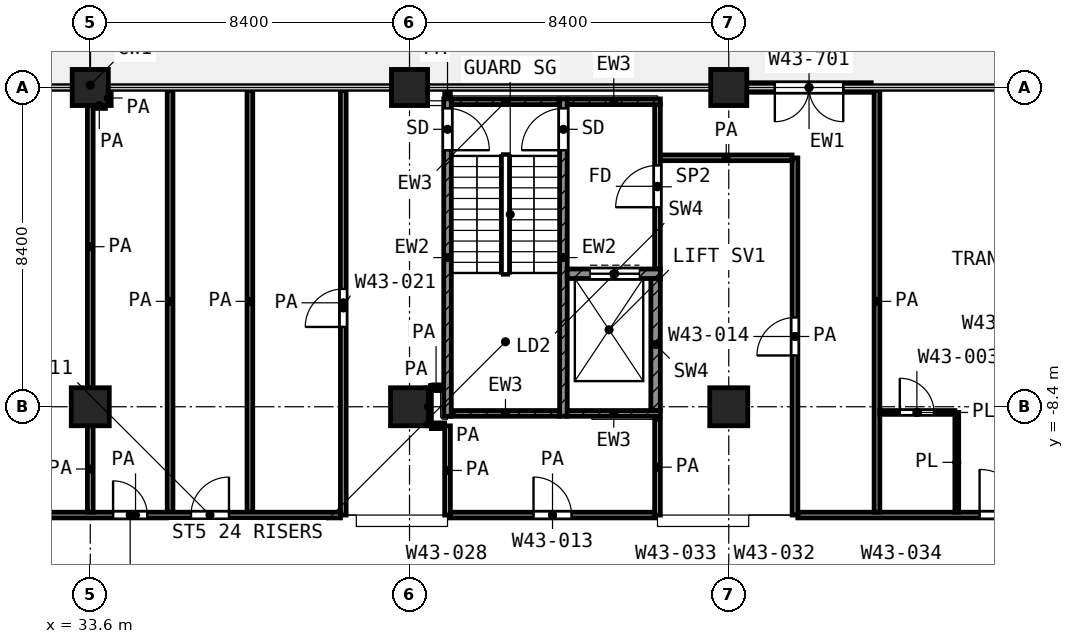
"""IFC4 building model, lengths in metres.
Left out: names, types, materials, properties, quantities, classifications, styles, units other than length and angle.
Written with IfcOpenShell. Run it as: python <this file> out.ifc"""

import sys

from ifc_helpers import new_model, si_unit, direction, frame, frame_2d, origin, origin_2d, place, context, subcontext, project, spatial, rectangle, extrude, element, fill, save


model = new_model("IFC4")
c1 = context("Model", 3, precision=1e-05, world=origin(), true_north=direction((0.0, 1.0)))
c2 = subcontext(c1, "Body", "Model", "MODEL_VIEW")
j1 = project(units=[si_unit("LENGTHUNIT", "METRE"), si_unit("PLANEANGLEUNIT", "RADIAN")], contexts=[c1])
p1 = place(None, origin())
s1 = spatial("IfcSite", under=j1, at=p1, CompositionType="ELEMENT")
p2 = place(p1, origin())
s2 = spatial("IfcBuilding", under=s1, at=p2, CompositionType="ELEMENT")
p3 = place(p2, frame((0.0, 0.0, 208.8)))
s3 = spatial("IfcBuildingStorey", under=s2, at=p3, CompositionType="ELEMENT", Elevation=208.8)
for number, where, z_axis, x_axis in (
    (1, (33.6, 0.0, 0.0), (0.0, 0.0, 1.0), (1.0, 0.0, 0.0)),
    (2, (42.0, 0.0, 0.0), (0.0, 0.0, 1.0), (1.0, 0.0, 0.0)),
    (3, (50.4, 0.0, 0.0), (0.0, 0.0, 1.0), (1.0, 0.0, 0.0)),
):
    element("IfcColumn", number, at=place(p3, frame(where, z_axis=z_axis, x_axis=x_axis)), inside=s3, PredefinedType="COLUMN", context=c2, shape_type="SweptSolid", body=[
        extrude(rectangle(XDim=0.95, YDim=0.95, at=origin_2d()), origin(), (0.0, 0.0, 1.0), 4.2),
    ])
for number, where, z_axis, x_axis in (
    (4, (33.6, -8.4, 0.0), (0.0, 0.0, 1.0), (1.0, 0.0, 0.0)),
    (5, (42.0, -8.4, 0.0), (0.0, 0.0, 1.0), (1.0, 0.0, 0.0)),
    (6, (50.4, -8.4, 0.0), (0.0, 0.0, 1.0), (1.0, 0.0, 0.0)),
):
    element("IfcColumn", number, at=place(p3, frame(where, z_axis=z_axis, x_axis=x_axis)), inside=s3, PredefinedType="COLUMN", context=c2, shape_type="SweptSolid", body=[
        extrude(rectangle(XDim=1.0, YDim=1.0, at=origin_2d()), origin(), (0.0, 0.0, 1.0), 4.2),
    ])
p4 = place(p3, frame((54.15, 0.0, 0.0), z_axis=(0.0, 0.0, 1.0), x_axis=(-1.0, 0.0, 0.0)))
e7 = element("IfcWall", 7, at=p4, inside=s3, PredefinedType="SOLIDWALL", context=c2, shape_type="SweptSolid", body=[
    extrude(rectangle(XDim=3.275, YDim=0.25, at=frame_2d((1.637, 0.0))), origin(), (0.0, 0.0, 1.0), 3.58),
])
p5 = place(p4, frame((0.738, 0.0, 0.0)))
e8 = element("IfcOpeningElement", 8, at=p5, cuts=e7, PredefinedType="OPENING", context=c2, shape_type="SweptSolid", body=[
    extrude(rectangle(XDim=1.8, YDim=2.1, at=frame_2d((0.9, 1.05))), frame((0.0, 0.135, 0.0), z_axis=(0.0, -1.0, 0.0), x_axis=(1.0, 0.0, 0.0)), (0.0, 0.0, 1.0), 0.27),
])
p6 = place(p3, frame((43.0, -8.65, 0.0), z_axis=(0.0, 0.0, 1.0), x_axis=(0.0, 1.0, 0.0)))
e9 = element("IfcWall", 9, at=p6, inside=s3, PredefinedType="SHEAR", context=c2, shape_type="SweptSolid", body=[
    extrude(rectangle(XDim=8.35, YDim=0.2, at=frame_2d((4.175, 0.0))), origin(), (0.0, 0.0, 1.0), 3.7),
])
p7 = place(p6, frame((7.0, 0.0, 0.0)))
e10 = element("IfcOpeningElement", 10, at=p7, cuts=e9, PredefinedType="OPENING", context=c2, shape_type="SweptSolid", body=[
    extrude(rectangle(XDim=1.1, YDim=2.1, at=frame_2d((0.55, 1.05))), frame((0.0, 0.11, 0.0), z_axis=(0.0, -1.0, 0.0), x_axis=(1.0, 0.0, 0.0)), (0.0, 0.0, 1.0), 0.22),
])
p8 = place(p3, frame((46.05, -8.65, 0.0), z_axis=(0.0, 0.0, 1.0), x_axis=(0.0, 1.0, 0.0)))
e11 = element("IfcWall", 11, at=p8, inside=s3, PredefinedType="SHEAR", context=c2, shape_type="SweptSolid", body=[
    extrude(rectangle(XDim=8.35, YDim=0.2, at=frame_2d((4.175, 0.0))), origin(), (0.0, 0.0, 1.0), 3.7),
])
p9 = place(p8, frame((7.0, 0.0, 0.0)))
e12 = element("IfcOpeningElement", 12, at=p9, cuts=e11, PredefinedType="OPENING", context=c2, shape_type="SweptSolid", body=[
    extrude(rectangle(XDim=1.1, YDim=2.1, at=frame_2d((0.55, 1.05))), frame((0.0, 0.11, 0.0), z_axis=(0.0, -1.0, 0.0), x_axis=(1.0, 0.0, 0.0)), (0.0, 0.0, 1.0), 0.22),
])
p10 = place(p3, frame((43.1, -0.375, 0.0), z_axis=(0.0, 0.0, 1.0), x_axis=(1.0, 0.0, 0.0)))
e13 = element("IfcWall", 13, at=p10, inside=s3, PredefinedType="SHEAR", context=c2, shape_type="SweptSolid", body=[
    extrude(rectangle(XDim=2.85, YDim=0.15, at=frame_2d((1.425, 0.0))), origin(), (0.0, 0.0, 1.0), 3.7),
])
p11 = place(p3, frame((46.15, -0.375, 0.0), z_axis=(0.0, 0.0, 1.0), x_axis=(1.0, 0.0, 0.0)))
e14 = element("IfcWall", 14, at=p11, inside=s3, PredefinedType="SHEAR", context=c2, shape_type="SweptSolid", body=[
    extrude(rectangle(XDim=2.45, YDim=0.15, at=frame_2d((1.225, 0.0))), origin(), (0.0, 0.0, 1.0), 3.7),
])
p12 = place(p3, frame((43.1, -8.575, 0.0), z_axis=(0.0, 0.0, 1.0), x_axis=(1.0, 0.0, 0.0)))
e15 = element("IfcWall", 15, at=p12, inside=s3, PredefinedType="SHEAR", context=c2, shape_type="SweptSolid", body=[
    extrude(rectangle(XDim=2.85, YDim=0.15, at=frame_2d((1.425, 0.0))), origin(), (0.0, 0.0, 1.0), 3.7),
])
p13 = place(p3, frame((46.15, -8.575, 0.0), z_axis=(0.0, 0.0, 1.0), x_axis=(1.0, 0.0, 0.0)))
e16 = element("IfcWall", 16, at=p13, inside=s3, PredefinedType="SHEAR", context=c2, shape_type="SweptSolid", body=[
    extrude(rectangle(XDim=2.45, YDim=0.15, at=frame_2d((1.225, 0.0))), origin(), (0.0, 0.0, 1.0), 3.7),
])
p14 = place(p3, frame((46.15, -4.9, 0.0), z_axis=(0.0, 0.0, 1.0), x_axis=(1.0, 0.0, 0.0)))
e17 = element("IfcWall", 17, at=p14, inside=s3, PredefinedType="SHEAR", context=c2, shape_type="SweptSolid", body=[
    extrude(rectangle(XDim=2.45, YDim=0.25, at=frame_2d((1.225, 0.0))), origin(), (0.0, 0.0, 1.0), 3.7),
])
p15 = place(p14, frame((0.6, 0.0, 0.0)))
e18 = element("IfcOpeningElement", 18, at=p15, cuts=e17, PredefinedType="OPENING", context=c2, shape_type="SweptSolid", body=[
    extrude(rectangle(XDim=1.3, YDim=2.1, at=frame_2d((0.65, 1.05))), frame((0.0, 0.135, 0.0), z_axis=(0.0, -1.0, 0.0), x_axis=(1.0, 0.0, 0.0)), (0.0, 0.0, 1.0), 0.27),
])
p16 = place(p3, frame((48.475, -8.5, 0.0), z_axis=(0.0, 0.0, 1.0), x_axis=(0.0, 1.0, 0.0)))
e19 = element("IfcWall", 19, at=p16, inside=s3, PredefinedType="SHEAR", context=c2, shape_type="SweptSolid", body=[
    extrude(rectangle(XDim=3.475, YDim=0.25, at=frame_2d((1.738, 0.0))), origin(), (0.0, 0.0, 1.0), 3.7),
])
p17 = place(p3, frame((48.525, -4.775, 0.0), z_axis=(0.0, 0.0, 1.0), x_axis=(0.0, 1.0, 0.0)))
e20 = element("IfcWall", 20, at=p17, inside=s3, PredefinedType="PARTITIONING", context=c2, shape_type="SweptSolid", body=[
    extrude(rectangle(XDim=4.325, YDim=0.15, at=frame_2d((2.163, 0.0))), origin(), (0.0, 0.0, 1.0), 3.7),
])
p18 = place(p17, frame((1.625, 0.0, 0.0)))
e21 = element("IfcOpeningElement", 21, at=p18, cuts=e20, PredefinedType="OPENING", context=c2, shape_type="SweptSolid", body=[
    extrude(rectangle(XDim=1.1, YDim=2.1, at=frame_2d((0.55, 1.05))), frame((0.0, 0.085, 0.0), z_axis=(0.0, -1.0, 0.0), x_axis=(1.0, 0.0, 0.0)), (0.0, 0.0, 1.0), 0.17),
])
p19 = place(p3, frame((54.375, -8.55, 0.0), z_axis=(0.0, 0.0, 1.0), x_axis=(1.0, 0.0, 0.0)))
e22 = element("IfcWall", 22, at=p19, inside=s3, PredefinedType="PARTITIONING", context=c2, shape_type="SweptSolid", body=[
    extrude(rectangle(XDim=1.975, YDim=0.1, at=frame_2d((0.988, 0.0))), origin(), (0.0, 0.0, 1.0), 3.7),
])
p20 = place(p19, frame((0.525, 0.0, 0.0)))
e23 = element("IfcOpeningElement", 23, at=p20, cuts=e22, PredefinedType="OPENING", context=c2, shape_type="SweptSolid", body=[
    extrude(rectangle(XDim=0.9, YDim=2.1, at=frame_2d((0.45, 1.05))), frame((0.0, 0.06, 0.0), z_axis=(0.0, -1.0, 0.0), x_axis=(1.0, 0.0, 0.0)), (0.0, 0.0, 1.0), 0.12),
])
p21 = place(p3, frame((56.4, -11.175, 0.0), z_axis=(0.0, 0.0, 1.0), x_axis=(0.0, 1.0, 0.0)))
e24 = element("IfcWall", 24, at=p21, inside=s3, PredefinedType="PARTITIONING", context=c2, shape_type="SweptSolid", body=[
    extrude(rectangle(XDim=2.625, YDim=0.1, at=frame_2d((1.312, 0.0))), origin(), (0.0, 0.0, 1.0), 3.7),
])
p22 = place(p3, frame((29.4, -11.25, 0.0), z_axis=(0.0, 0.0, 1.0), x_axis=(1.0, 0.0, 0.0)))
e25 = element("IfcWall", 25, at=p22, inside=s3, PredefinedType="PARTITIONING", context=c2, shape_type="SweptSolid", body=[
    extrude(rectangle(XDim=10.782, YDim=0.15, at=frame_2d((5.391, 0.0))), origin(), (0.0, 0.0, 1.0), 3.7),
])
p23 = place(p22, frame((1.6, 0.0, 0.0)))
e26 = element("IfcOpeningElement", 26, at=p23, cuts=e25, PredefinedType="OPENING", context=c2, shape_type="SweptSolid", body=[
    extrude(rectangle(XDim=1.0, YDim=2.1, at=frame_2d((0.5, 1.05))), frame((0.0, 0.085, 0.0), z_axis=(0.0, -1.0, 0.0), x_axis=(1.0, 0.0, 0.0)), (0.0, 0.0, 1.0), 0.17),
])
p24 = place(p22, frame((4.8, 0.0, 0.0)))
e27 = element("IfcOpeningElement", 27, at=p24, cuts=e25, PredefinedType="OPENING", context=c2, shape_type="SweptSolid", body=[
    extrude(rectangle(XDim=0.9, YDim=2.1, at=frame_2d((0.45, 1.05))), frame((0.0, 0.085, 0.0), z_axis=(0.0, -1.0, 0.0), x_axis=(1.0, 0.0, 0.0)), (0.0, 0.0, 1.0), 0.17),
])
p25 = place(p22, frame((6.85, 0.0, 0.0)))
e28 = element("IfcOpeningElement", 28, at=p25, cuts=e25, PredefinedType="OPENING", context=c2, shape_type="SweptSolid", body=[
    extrude(rectangle(XDim=1.0, YDim=2.1, at=frame_2d((0.5, 1.05))), frame((0.0, 0.085, 0.0), z_axis=(0.0, -1.0, 0.0), x_axis=(1.0, 0.0, 0.0)), (0.0, 0.0, 1.0), 0.17),
])
p26 = place(p3, frame((43.075, -11.25, 0.0), z_axis=(0.0, 0.0, 1.0), x_axis=(1.0, 0.0, 0.0)))
e29 = element("IfcWall", 29, at=p26, inside=s3, PredefinedType="PARTITIONING", context=c2, shape_type="SweptSolid", body=[
    extrude(rectangle(XDim=5.375, YDim=0.15, at=frame_2d((2.688, 0.0))), origin(), (0.0, 0.0, 1.0), 3.7),
])
p27 = place(p26, frame((2.188, 0.0, 0.0)))
e30 = element("IfcOpeningElement", 30, at=p27, cuts=e29, PredefinedType="OPENING", context=c2, shape_type="SweptSolid", body=[
    extrude(rectangle(XDim=1.0, YDim=2.1, at=frame_2d((0.5, 1.05))), frame((0.0, 0.085, 0.0), z_axis=(0.0, -1.0, 0.0), x_axis=(1.0, 0.0, 0.0)), (0.0, 0.0, 1.0), 0.17),
])
p28 = place(p3, frame((52.218, -11.25, 0.0), z_axis=(0.0, 0.0, 1.0), x_axis=(1.0, 0.0, 0.0)))
e31 = element("IfcWall", 31, at=p28, inside=s3, PredefinedType="PARTITIONING", context=c2, shape_type="SweptSolid", body=[
    extrude(rectangle(XDim=14.902, YDim=0.15, at=frame_2d((7.451, 0.0))), origin(), (0.0, 0.0, 1.0), 3.7),
])
p29 = place(p28, frame((4.782, 0.0, 0.0)))
e32 = element("IfcOpeningElement", 32, at=p29, cuts=e31, PredefinedType="OPENING", context=c2, shape_type="SweptSolid", body=[
    extrude(rectangle(XDim=1.2, YDim=2.1, at=frame_2d((0.6, 1.05))), frame((0.0, 0.085, 0.0), z_axis=(0.0, -1.0, 0.0), x_axis=(1.0, 0.0, 0.0)), (0.0, 0.0, 1.0), 0.17),
])
p30 = place(p28, frame((6.382, 0.0, 0.0)))
e33 = element("IfcOpeningElement", 33, at=p30, cuts=e31, PredefinedType="OPENING", context=c2, shape_type="SweptSolid", body=[
    extrude(rectangle(XDim=1.2, YDim=2.1, at=frame_2d((0.6, 1.05))), frame((0.0, 0.085, 0.0), z_axis=(0.0, -1.0, 0.0), x_axis=(1.0, 0.0, 0.0)), (0.0, 0.0, 1.0), 0.17),
])
p31 = place(p28, frame((9.432, 0.0, 0.0)))
e34 = element("IfcOpeningElement", 34, at=p31, cuts=e31, PredefinedType="OPENING", context=c2, shape_type="SweptSolid", body=[
    extrude(rectangle(XDim=1.2, YDim=2.1, at=frame_2d((0.6, 1.05))), frame((0.0, 0.085, 0.0), z_axis=(0.0, -1.0, 0.0), x_axis=(1.0, 0.0, 0.0)), (0.0, 0.0, 1.0), 0.17),
])
p32 = place(p28, frame((12.532, 0.0, 0.0)))
e35 = element("IfcOpeningElement", 35, at=p32, cuts=e31, PredefinedType="OPENING", context=c2, shape_type="SweptSolid", body=[
    extrude(rectangle(XDim=1.0, YDim=2.1, at=frame_2d((0.5, 1.05))), frame((0.0, 0.085, 0.0), z_axis=(0.0, -1.0, 0.0), x_axis=(1.0, 0.0, 0.0)), (0.0, 0.0, 1.0), 0.17),
])
p33 = place(p3, frame((42.577, -8.9, 0.0), z_axis=(0.0, 0.0, 1.0), x_axis=(1.0, 0.0, 0.0)))
e36 = element("IfcWall", 36, at=p33, inside=s3, PredefinedType="PARTITIONING", context=c2, shape_type="SweptSolid", body=[
    extrude(rectangle(XDim=0.346, YDim=0.15, at=frame_2d((0.173, 0.0))), origin(), (0.0, 0.0, 1.0), 3.7),
])
p34 = place(p3, frame((42.577, -7.9, 0.0), z_axis=(0.0, 0.0, 1.0), x_axis=(1.0, 0.0, 0.0)))
e37 = element("IfcWall", 37, at=p34, inside=s3, PredefinedType="PARTITIONING", context=c2, shape_type="SweptSolid", body=[
    extrude(rectangle(XDim=0.243, YDim=0.15, at=frame_2d((0.122, 0.0))), origin(), (0.0, 0.0, 1.0), 3.7),
])
p35 = place(p3, frame((48.6, -1.85, 0.0), z_axis=(0.0, 0.0, 1.0), x_axis=(1.0, 0.0, 0.0)))
e38 = element("IfcWall", 38, at=p35, inside=s3, PredefinedType="PARTITIONING", context=c2, shape_type="SweptSolid", body=[
    extrude(rectangle(XDim=3.466, YDim=0.15, at=frame_2d((1.733, 0.0))), origin(), (0.0, 0.0, 1.0), 3.7),
])
p36 = place(p3, frame((33.677, -0.475, 0.0), z_axis=(0.0, 0.0, 1.0), x_axis=(1.0, 0.0, 0.0)))
e39 = element("IfcWall", 39, at=p36, inside=s3, PredefinedType="PARTITIONING", context=c2, shape_type="SweptSolid", body=[
    extrude(rectangle(XDim=0.321, YDim=0.15, at=frame_2d((0.161, 0.0))), origin(), (0.0, 0.0, 1.0), 3.7),
])
p37 = place(p3, frame((33.6, -11.175, 0.0), z_axis=(0.0, 0.0, 1.0), x_axis=(0.0, 1.0, 0.0)))
e40 = element("IfcWall", 40, at=p37, inside=s3, PredefinedType="PARTITIONING", context=c2, shape_type="SweptSolid", body=[
    extrude(rectangle(XDim=2.275, YDim=0.15, at=frame_2d((1.138, 0.0))), origin(), (0.0, 0.0, 1.0), 3.7),
])
p38 = place(p3, frame((33.6, -7.9, 0.0), z_axis=(0.0, 0.0, 1.0), x_axis=(0.0, 1.0, 0.0)))
e41 = element("IfcWall", 41, at=p38, inside=s3, PredefinedType="PARTITIONING", context=c2, shape_type="SweptSolid", body=[
    extrude(rectangle(XDim=7.423, YDim=0.15, at=frame_2d((3.711, 0.0))), origin(), (0.0, 0.0, 1.0), 3.7),
])
p39 = place(p3, frame((34.075, -0.473, 0.0), z_axis=(0.0, 0.0, 1.0), x_axis=(0.0, 1.0, 0.0)))
e42 = element("IfcWall", 42, at=p39, inside=s3, PredefinedType="PARTITIONING", context=c2, shape_type="SweptSolid", body=[
    extrude(rectangle(XDim=0.393, YDim=0.15, at=frame_2d((0.196, 0.0))), origin(), (0.0, 0.0, 1.0), 3.7),
])
for number, where, z_axis, x_axis in (
    (43, (35.7, -11.175, 0.0), (0.0, 0.0, 1.0), (0.0, 1.0, 0.0)),
    (44, (37.8, -11.175, 0.0), (0.0, 0.0, 1.0), (0.0, 1.0, 0.0)),
):
    element("IfcWall", number, at=place(p3, frame(where, z_axis=z_axis, x_axis=x_axis)), inside=s3, PredefinedType="PARTITIONING", context=c2, shape_type="SweptSolid", body=[
        extrude(rectangle(XDim=11.095, YDim=0.15, at=frame_2d((5.547, 0.0))), origin(), (0.0, 0.0, 1.0), 3.7),
    ])
p40 = place(p3, frame((40.257, -11.25, 0.0), z_axis=(0.0, 0.0, 1.0), x_axis=(0.0, 1.0, 0.0)))
e45 = element("IfcWall", 45, at=p40, inside=s3, PredefinedType="PARTITIONING", context=c2, shape_type="SweptSolid", body=[
    extrude(rectangle(XDim=11.17, YDim=0.15, at=frame_2d((5.585, 0.0))), origin(), (0.0, 0.0, 1.0), 3.7),
])
p41 = place(p40, frame((4.95, 0.0, 0.0)))
e46 = element("IfcOpeningElement", 46, at=p41, cuts=e45, PredefinedType="OPENING", context=c2, shape_type="SweptSolid", body=[
    extrude(rectangle(XDim=1.0, YDim=2.1, at=frame_2d((0.5, 1.05))), frame((0.0, 0.085, 0.0), z_axis=(0.0, -1.0, 0.0), x_axis=(1.0, 0.0, 0.0)), (0.0, 0.0, 1.0), 0.17),
])
p42 = place(p3, frame((42.5, -8.899, 0.0), z_axis=(0.0, 0.0, 1.0), x_axis=(0.0, 1.0, 0.0)))
e47 = element("IfcWall", 47, at=p42, inside=s3, PredefinedType="PARTITIONING", context=c2, shape_type="SweptSolid", body=[
    extrude(rectangle(XDim=0.997, YDim=0.15, at=frame_2d((0.499, 0.0))), origin(), (0.0, 0.0, 1.0), 3.7),
])
p43 = place(p3, frame((43.0, -11.25, 0.0), z_axis=(0.0, 0.0, 1.0), x_axis=(0.0, 1.0, 0.0)))
e48 = element("IfcWall", 48, at=p43, inside=s3, PredefinedType="PARTITIONING", context=c2, shape_type="SweptSolid", body=[
    extrude(rectangle(XDim=2.348, YDim=0.15, at=frame_2d((1.174, 0.0))), origin(), (0.0, 0.0, 1.0), 3.7),
])
p44 = place(p3, frame((43.0, -0.27, 0.0), z_axis=(0.0, 0.0, 1.0), x_axis=(0.0, 1.0, 0.0)))
e49 = element("IfcWall", 49, at=p44, inside=s3, PredefinedType="PARTITIONING", context=c2, shape_type="SweptSolid", body=[
    extrude(rectangle(XDim=0.19, YDim=0.15, at=frame_2d((0.095, 0.0))), origin(), (0.0, 0.0, 1.0), 3.7),
])
p45 = place(p3, frame((48.525, -11.25, 0.0), z_axis=(0.0, 0.0, 1.0), x_axis=(0.0, 1.0, 0.0)))
e50 = element("IfcWall", 50, at=p45, inside=s3, PredefinedType="PARTITIONING", context=c2, shape_type="SweptSolid", body=[
    extrude(rectangle(XDim=2.52, YDim=0.15, at=frame_2d((1.26, 0.0))), origin(), (0.0, 0.0, 1.0), 3.7),
])
p46 = place(p3, frame((52.143, -11.25, 0.0), z_axis=(0.0, 0.0, 1.0), x_axis=(0.0, 1.0, 0.0)))
e51 = element("IfcWall", 51, at=p46, inside=s3, PredefinedType="PARTITIONING", context=c2, shape_type="SweptSolid", body=[
    extrude(rectangle(XDim=9.398, YDim=0.15, at=frame_2d((4.699, 0.0))), origin(), (0.0, 0.0, 1.0), 3.7),
])
p47 = place(p46, frame((4.199, 0.0, 0.0)))
e52 = element("IfcOpeningElement", 52, at=p47, cuts=e51, PredefinedType="OPENING", context=c2, shape_type="SweptSolid", body=[
    extrude(rectangle(XDim=1.0, YDim=2.1, at=frame_2d((0.5, 1.05))), frame((0.0, 0.085, 0.0), z_axis=(0.0, -1.0, 0.0), x_axis=(1.0, 0.0, 0.0)), (0.0, 0.0, 1.0), 0.17),
])
p48 = place(p3, frame((54.3, -11.175, 0.0), z_axis=(0.0, 0.0, 1.0), x_axis=(0.0, 1.0, 0.0)))
e53 = element("IfcWall", 53, at=p48, inside=s3, PredefinedType="PARTITIONING", context=c2, shape_type="SweptSolid", body=[
    extrude(rectangle(XDim=11.095, YDim=0.15, at=frame_2d((5.547, 0.0))), origin(), (0.0, 0.0, 1.0), 3.7),
])
p49 = place(p5, origin())
e54 = element("IfcDoor", 54, at=p49, inside=s3, OperationType="DOUBLE_DOOR_SINGLE_SWING", PredefinedType="DOOR", context=c2, shape_type="SweptSolid", body=[
    extrude(rectangle(XDim=1.8, YDim=2.1, at=frame_2d((0.9, 1.05))), frame((0.0, 0.025, 0.0), z_axis=(0.0, -1.0, 0.0), x_axis=(1.0, 0.0, 0.0)), (0.0, 0.0, 1.0), 0.05),
])
fill(e8, e54)
p50 = place(p7, frame((1.1, 0.0, 0.0), z_axis=(0.0, 0.0, 1.0), x_axis=(-1.0, 0.0, 0.0)))
e55 = element("IfcDoor", 55, at=p50, inside=s3, OperationType="SINGLE_SWING_LEFT", PredefinedType="DOOR", context=c2, shape_type="SweptSolid", body=[
    extrude(rectangle(XDim=1.1, YDim=2.1, at=frame_2d((0.55, 1.05))), frame((0.0, 0.025, 0.0), z_axis=(0.0, -1.0, 0.0), x_axis=(1.0, 0.0, 0.0)), (0.0, 0.0, 1.0), 0.05),
])
fill(e10, e55)
p51 = place(p9, origin())
e56 = element("IfcDoor", 56, at=p51, inside=s3, OperationType="SINGLE_SWING_LEFT", PredefinedType="DOOR", context=c2, shape_type="SweptSolid", body=[
    extrude(rectangle(XDim=1.1, YDim=2.1, at=frame_2d((0.55, 1.05))), frame((0.0, 0.025, 0.0), z_axis=(0.0, -1.0, 0.0), x_axis=(1.0, 0.0, 0.0)), (0.0, 0.0, 1.0), 0.05),
])
fill(e12, e56)
p52 = place(p15, origin())
e57 = element("IfcDoor", 57, at=p52, inside=s3, OperationType="DOUBLE_DOOR_SLIDING", PredefinedType="DOOR", context=c2, shape_type="SweptSolid", body=[
    extrude(rectangle(XDim=1.3, YDim=2.1, at=frame_2d((0.65, 1.05))), frame((0.0, 0.025, 0.0), z_axis=(0.0, -1.0, 0.0), x_axis=(1.0, 0.0, 0.0)), (0.0, 0.0, 1.0), 0.05),
])
fill(e18, e57)
p53 = place(p18, origin())
e58 = element("IfcDoor", 58, at=p53, inside=s3, OperationType="SINGLE_SWING_LEFT", PredefinedType="DOOR", context=c2, shape_type="SweptSolid", body=[
    extrude(rectangle(XDim=1.1, YDim=2.1, at=frame_2d((0.55, 1.05))), frame((0.0, 0.025, 0.0), z_axis=(0.0, -1.0, 0.0), x_axis=(1.0, 0.0, 0.0)), (0.0, 0.0, 1.0), 0.05),
])
fill(e21, e58)
p54 = place(p27, origin())
e59 = element("IfcDoor", 59, at=p54, inside=s3, OperationType="SINGLE_SWING_LEFT", PredefinedType="DOOR", context=c2, shape_type="SweptSolid", body=[
    extrude(rectangle(XDim=1.0, YDim=2.1, at=frame_2d((0.5, 1.05))), frame((0.0, 0.025, 0.0), z_axis=(0.0, -1.0, 0.0), x_axis=(1.0, 0.0, 0.0)), (0.0, 0.0, 1.0), 0.05),
])
fill(e30, e59)
p55 = place(p47, origin())
e60 = element("IfcDoor", 60, at=p55, inside=s3, OperationType="SINGLE_SWING_LEFT", PredefinedType="DOOR", context=c2, shape_type="SweptSolid", body=[
    extrude(rectangle(XDim=1.0, YDim=2.1, at=frame_2d((0.5, 1.05))), frame((0.0, 0.025, 0.0), z_axis=(0.0, -1.0, 0.0), x_axis=(1.0, 0.0, 0.0)), (0.0, 0.0, 1.0), 0.05),
])
fill(e52, e60)
p56 = place(p29, origin())
e61 = element("IfcDoor", 61, at=p56, inside=s3, OperationType="SINGLE_SWING_LEFT", PredefinedType="DOOR", context=c2, shape_type="SweptSolid", body=[
    extrude(rectangle(XDim=1.2, YDim=2.1, at=frame_2d((0.6, 1.05))), frame((0.0, 0.025, 0.0), z_axis=(0.0, -1.0, 0.0), x_axis=(1.0, 0.0, 0.0)), (0.0, 0.0, 1.0), 0.05),
])
fill(e32, e61)
p57 = place(p20, origin())
e62 = element("IfcDoor", 62, at=p57, inside=s3, OperationType="SINGLE_SWING_LEFT", PredefinedType="DOOR", context=c2, shape_type="SweptSolid", body=[
    extrude(rectangle(XDim=0.9, YDim=2.1, at=frame_2d((0.45, 1.05))), frame((0.0, 0.025, 0.0), z_axis=(0.0, -1.0, 0.0), x_axis=(1.0, 0.0, 0.0)), (0.0, 0.0, 1.0), 0.05),
])
fill(e23, e62)
p58 = place(p24, origin())
e63 = element("IfcDoor", 63, at=p58, inside=s3, OperationType="SINGLE_SWING_LEFT", PredefinedType="DOOR", context=c2, shape_type="SweptSolid", body=[
    extrude(rectangle(XDim=0.9, YDim=2.1, at=frame_2d((0.45, 1.05))), frame((0.0, 0.025, 0.0), z_axis=(0.0, -1.0, 0.0), x_axis=(1.0, 0.0, 0.0)), (0.0, 0.0, 1.0), 0.05),
])
fill(e27, e63)
p59 = place(p25, origin())
e64 = element("IfcDoor", 64, at=p59, inside=s3, OperationType="SINGLE_SWING_RIGHT", PredefinedType="DOOR", context=c2, shape_type="SweptSolid", body=[
    extrude(rectangle(XDim=1.0, YDim=2.1, at=frame_2d((0.5, 1.05))), frame((0.0, 0.025, 0.0), z_axis=(0.0, -1.0, 0.0), x_axis=(1.0, 0.0, 0.0)), (0.0, 0.0, 1.0), 0.05),
])
fill(e28, e64)
p60 = place(p41, origin())
e65 = element("IfcDoor", 65, at=p60, inside=s3, OperationType="SINGLE_SWING_LEFT", PredefinedType="DOOR", context=c2, shape_type="SweptSolid", body=[
    extrude(rectangle(XDim=1.0, YDim=2.1, at=frame_2d((0.5, 1.05))), frame((0.0, 0.025, 0.0), z_axis=(0.0, -1.0, 0.0), x_axis=(1.0, 0.0, 0.0)), (0.0, 0.0, 1.0), 0.05),
])
fill(e46, e65)
save(model, sys.argv[1])
